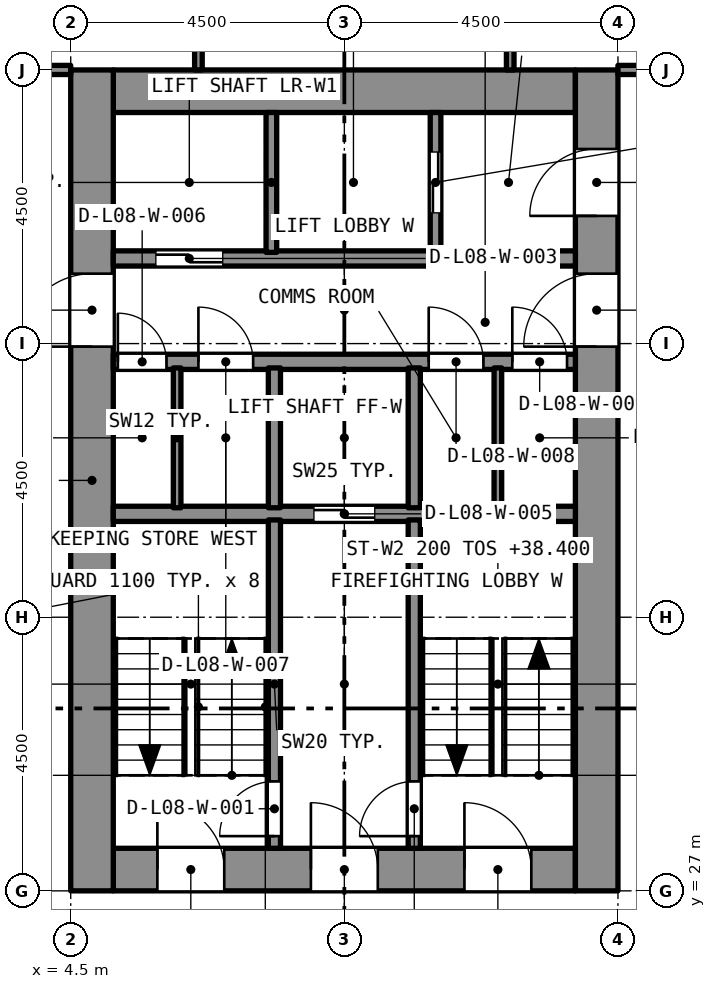
"""IFC4 building model, lengths in metres.
Left out: names, types, materials, properties, quantities, classifications, styles, units other than length and angle.
Written with IfcOpenShell. Run it as: python <this file> out.ifc"""

import sys

from ifc_helpers import new_model, si_unit, direction, frame, frame_2d, origin, place, context, subcontext, project, spatial, rectangle, extrude, element, fill, save


model = new_model("IFC4")
c1 = context("Model", 3, precision=1e-05, world=origin(), true_north=direction((0.0, 1.0)))
c2 = subcontext(c1, "Body", "Model", "MODEL_VIEW")
j1 = project(units=[si_unit("LENGTHUNIT", "METRE"), si_unit("PLANEANGLEUNIT", "RADIAN")], contexts=[c1])
p1 = place(None, origin())
s1 = spatial("IfcSite", under=j1, at=p1, CompositionType="ELEMENT")
p2 = place(p1, origin())
s2 = spatial("IfcBuilding", under=s1, at=p2, CompositionType="ELEMENT")
p3 = place(p2, frame((0.0, 0.0, 36.8)))
s3 = spatial("IfcBuildingStorey", under=s2, at=p3, CompositionType="ELEMENT", Elevation=36.8)
p4 = place(p3, frame((5.2, 27.35, 0.0), z_axis=(0.0, 0.0, 1.0), x_axis=(1.0, 0.0, 0.0)))
e1 = element("IfcWall", 1, at=p4, inside=s3, PredefinedType="SOLIDWALL", context=c2, shape_type="SweptSolid", body=[
    extrude(rectangle(XDim=7.6, YDim=0.7, at=frame_2d((3.8, 0.0))), origin(), (0.0, 0.0, 1.0), 3.2),
])
p5 = place(p4, frame((0.725, 0.0, 0.0)))
e2 = element("IfcOpeningElement", 2, at=p5, cuts=e1, PredefinedType="OPENING", context=c2, shape_type="SweptSolid", body=[
    extrude(rectangle(XDim=1.1, YDim=2.1, at=frame_2d((0.55, 1.05))), frame((0.0, 0.36, 0.0), z_axis=(0.0, -1.0, 0.0), x_axis=(1.0, 0.0, 0.0)), (0.0, 0.0, 1.0), 0.72),
])
p6 = place(p4, frame((3.25, 0.0, 0.0)))
e3 = element("IfcOpeningElement", 3, at=p6, cuts=e1, PredefinedType="OPENING", context=c2, shape_type="SweptSolid", body=[
    extrude(rectangle(XDim=1.1, YDim=2.1, at=frame_2d((0.55, 1.05))), frame((0.0, 0.36, 0.0), z_axis=(0.0, -1.0, 0.0), x_axis=(1.0, 0.0, 0.0)), (0.0, 0.0, 1.0), 0.72),
])
p7 = place(p4, frame((5.775, 0.0, 0.0)))
e4 = element("IfcOpeningElement", 4, at=p7, cuts=e1, PredefinedType="OPENING", context=c2, shape_type="SweptSolid", body=[
    extrude(rectangle(XDim=1.1, YDim=2.1, at=frame_2d((0.55, 1.05))), frame((0.0, 0.36, 0.0), z_axis=(0.0, -1.0, 0.0), x_axis=(1.0, 0.0, 0.0)), (0.0, 0.0, 1.0), 0.72),
])
p8 = place(p3, frame((5.2, 40.15, 0.0), z_axis=(0.0, 0.0, 1.0), x_axis=(1.0, 0.0, 0.0)))
e5 = element("IfcWall", 5, at=p8, inside=s3, PredefinedType="SOLIDWALL", context=c2, shape_type="SweptSolid", body=[
    extrude(rectangle(XDim=7.6, YDim=0.7, at=frame_2d((3.8, 0.0))), origin(), (0.0, 0.0, 1.0), 3.2),
])
p9 = place(p3, frame((4.85, 27.0, 0.0), z_axis=(0.0, 0.0, 1.0), x_axis=(0.0, 1.0, 0.0)))
e6 = element("IfcWall", 6, at=p9, inside=s3, PredefinedType="SOLIDWALL", context=c2, shape_type="SweptSolid", body=[
    extrude(rectangle(XDim=13.5, YDim=0.7, at=frame_2d((6.75, 0.0))), origin(), (0.0, 0.0, 1.0), 3.2),
])
p10 = place(p9, frame((8.95, 0.0, 0.0)))
e7 = element("IfcOpeningElement", 7, at=p10, cuts=e6, PredefinedType="OPENING", context=c2, shape_type="SweptSolid", body=[
    extrude(rectangle(XDim=1.2, YDim=2.1, at=frame_2d((0.6, 1.05))), frame((0.0, 0.36, 0.0), z_axis=(0.0, -1.0, 0.0), x_axis=(1.0, 0.0, 0.0)), (0.0, 0.0, 1.0), 0.72),
])
p11 = place(p3, frame((13.15, 27.0, 0.0), z_axis=(0.0, 0.0, 1.0), x_axis=(0.0, 1.0, 0.0)))
e8 = element("IfcWall", 8, at=p11, inside=s3, PredefinedType="SOLIDWALL", context=c2, shape_type="SweptSolid", body=[
    extrude(rectangle(XDim=13.5, YDim=0.7, at=frame_2d((6.75, 0.0))), origin(), (0.0, 0.0, 1.0), 3.2),
])
p12 = place(p11, frame((11.1, 0.0, 0.0)))
e9 = element("IfcOpeningElement", 9, at=p12, cuts=e8, PredefinedType="OPENING", context=c2, shape_type="SweptSolid", body=[
    extrude(rectangle(XDim=1.1, YDim=2.1, at=frame_2d((0.55, 1.05))), frame((0.0, 0.36, 0.0), z_axis=(0.0, -1.0, 0.0), x_axis=(1.0, 0.0, 0.0)), (0.0, 0.0, 1.0), 0.72),
])
p13 = place(p11, frame((8.95, 0.0, 0.0)))
e10 = element("IfcOpeningElement", 10, at=p13, cuts=e8, PredefinedType="OPENING", context=c2, shape_type="SweptSolid", body=[
    extrude(rectangle(XDim=1.2, YDim=2.1, at=frame_2d((0.6, 1.05))), frame((0.0, 0.36, 0.0), z_axis=(0.0, -1.0, 0.0), x_axis=(1.0, 0.0, 0.0)), (0.0, 0.0, 1.0), 0.72),
])
for number, where, z_axis, x_axis in (
    (11, (6.6, 40.5, 0.0), (0.0, 0.0, 1.0), (0.0, 1.0, 0.0)),
    (12, (11.728, 40.5, 0.0), (0.0, 0.0, 1.0), (0.0, 1.0, 0.0)),
):
    element("IfcWall", number, at=place(p3, frame(where, z_axis=z_axis, x_axis=x_axis)), inside=s3, PredefinedType="PARTITIONING", context=c2, shape_type="SweptSolid", body=[
        extrude(rectangle(XDim=3.157, YDim=0.125, at=frame_2d((1.579, 0.0))), origin(), (0.0, 0.0, 1.0), 2.9),
    ])
p14 = place(p3, frame((0.7, 40.5, 0.0), z_axis=(0.0, 0.0, 1.0), x_axis=(1.0, 0.0, 0.0)))
e13 = element("IfcWall", 13, at=p14, inside=s3, PredefinedType="PARTITIONING", context=c2, shape_type="SweptSolid", body=[
    extrude(rectangle(XDim=3.8, YDim=0.15, at=frame_2d((1.9, 0.0))), origin(), (0.0, 0.0, 1.0), 2.9),
])
p15 = place(p14, frame((1.05, 0.0, 0.0)))
e14 = element("IfcOpeningElement", 14, at=p15, cuts=e13, PredefinedType="OPENING", context=c2, shape_type="SweptSolid", body=[
    extrude(rectangle(XDim=1.0, YDim=2.1, at=frame_2d((0.5, 1.05))), frame((0.0, 0.085, 0.0), z_axis=(0.0, -1.0, 0.0), x_axis=(1.0, 0.0, 0.0)), (0.0, 0.0, 1.0), 0.17),
])
p16 = place(p3, frame((13.5, 40.5, 0.0), z_axis=(0.0, 0.0, 1.0), x_axis=(1.0, 0.0, 0.0)))
e15 = element("IfcWall", 15, at=p16, inside=s3, PredefinedType="PARTITIONING", context=c2, shape_type="SweptSolid", body=[
    extrude(rectangle(XDim=3.8, YDim=0.15, at=frame_2d((1.9, 0.0))), origin(), (0.0, 0.0, 1.0), 2.9),
])
p17 = place(p3, frame((5.2, 33.2, 0.0), z_axis=(0.0, 0.0, 1.0), x_axis=(1.0, 0.0, 0.0)))
e16 = element("IfcWall", 16, at=p17, inside=s3, PredefinedType="SOLIDWALL", context=c2, shape_type="SweptSolid", body=[
    extrude(rectangle(XDim=7.6, YDim=0.25, at=frame_2d((3.8, 0.0))), origin(), (0.0, 0.0, 1.0), 2.9),
])
p18 = place(p17, frame((3.3, 0.0, 0.0)))
e17 = element("IfcOpeningElement", 17, at=p18, cuts=e16, PredefinedType="OPENING", context=c2, shape_type="SweptSolid", body=[
    extrude(rectangle(XDim=1.0, YDim=2.1, at=frame_2d((0.5, 1.05))), frame((0.0, 0.135, 0.0), z_axis=(0.0, -1.0, 0.0), x_axis=(1.0, 0.0, 0.0)), (0.0, 0.0, 1.0), 0.27),
])
p19 = place(p3, frame((5.2, 35.7, 0.0), z_axis=(0.0, 0.0, 1.0), x_axis=(1.0, 0.0, 0.0)))
e18 = element("IfcWall", 18, at=p19, inside=s3, PredefinedType="SOLIDWALL", context=c2, shape_type="SweptSolid", body=[
    extrude(rectangle(XDim=7.6, YDim=0.25, at=frame_2d((3.8, 0.0))), origin(), (0.0, 0.0, 1.0), 2.9),
])
p20 = place(p19, frame((0.075, 0.0, 0.0)))
e19 = element("IfcOpeningElement", 19, at=p20, cuts=e18, PredefinedType="OPENING", context=c2, shape_type="SweptSolid", body=[
    extrude(rectangle(XDim=0.8, YDim=2.1, at=frame_2d((0.4, 1.05))), frame((0.0, 0.135, 0.0), z_axis=(0.0, -1.0, 0.0), x_axis=(1.0, 0.0, 0.0)), (0.0, 0.0, 1.0), 0.27),
])
p21 = place(p19, frame((1.4, 0.0, 0.0)))
e20 = element("IfcOpeningElement", 20, at=p21, cuts=e18, PredefinedType="OPENING", context=c2, shape_type="SweptSolid", body=[
    extrude(rectangle(XDim=0.9, YDim=2.1, at=frame_2d((0.45, 1.05))), frame((0.0, 0.135, 0.0), z_axis=(0.0, -1.0, 0.0), x_axis=(1.0, 0.0, 0.0)), (0.0, 0.0, 1.0), 0.27),
])
p22 = place(p19, frame((5.188, 0.0, 0.0)))
e21 = element("IfcOpeningElement", 21, at=p22, cuts=e18, PredefinedType="OPENING", context=c2, shape_type="SweptSolid", body=[
    extrude(rectangle(XDim=0.9, YDim=2.1, at=frame_2d((0.45, 1.05))), frame((0.0, 0.135, 0.0), z_axis=(0.0, -1.0, 0.0), x_axis=(1.0, 0.0, 0.0)), (0.0, 0.0, 1.0), 0.27),
])
p23 = place(p19, frame((6.562, 0.0, 0.0)))
e22 = element("IfcOpeningElement", 22, at=p23, cuts=e18, PredefinedType="OPENING", context=c2, shape_type="SweptSolid", body=[
    extrude(rectangle(XDim=0.9, YDim=2.1, at=frame_2d((0.45, 1.05))), frame((0.0, 0.135, 0.0), z_axis=(0.0, -1.0, 0.0), x_axis=(1.0, 0.0, 0.0)), (0.0, 0.0, 1.0), 0.27),
])
p24 = place(p3, frame((5.2, 37.4, 0.0), z_axis=(0.0, 0.0, 1.0), x_axis=(1.0, 0.0, 0.0)))
e23 = element("IfcWall", 23, at=p24, inside=s3, PredefinedType="SOLIDWALL", context=c2, shape_type="SweptSolid", body=[
    extrude(rectangle(XDim=7.6, YDim=0.25, at=frame_2d((3.8, 0.0))), origin(), (0.0, 0.0, 1.0), 2.9),
])
p25 = place(p24, frame((0.7, 0.0, 0.0)))
e24 = element("IfcOpeningElement", 24, at=p25, cuts=e23, PredefinedType="OPENING", context=c2, shape_type="SweptSolid", body=[
    extrude(rectangle(XDim=1.1, YDim=2.4, at=frame_2d((0.55, 1.2))), frame((0.0, 0.135, 0.0), z_axis=(0.0, -1.0, 0.0), x_axis=(1.0, 0.0, 0.0)), (0.0, 0.0, 1.0), 0.27),
])
p26 = place(p3, frame((7.85, 27.7, 0.0), z_axis=(0.0, 0.0, 1.0), x_axis=(0.0, 1.0, 0.0)))
e25 = element("IfcWall", 25, at=p26, inside=s3, PredefinedType="SOLIDWALL", context=c2, shape_type="SweptSolid", body=[
    extrude(rectangle(XDim=5.4, YDim=0.2, at=frame_2d((2.7, 0.0))), origin(), (0.0, 0.0, 1.0), 2.9),
])
p27 = place(p26, frame((0.2, 0.0, 0.0)))
e26 = element("IfcOpeningElement", 26, at=p27, cuts=e25, PredefinedType="OPENING", context=c2, shape_type="SweptSolid", body=[
    extrude(rectangle(XDim=0.9, YDim=2.1, at=frame_2d((0.45, 1.05))), frame((0.0, 0.11, 0.0), z_axis=(0.0, -1.0, 0.0), x_axis=(1.0, 0.0, 0.0)), (0.0, 0.0, 1.0), 0.22),
])
p28 = place(p3, frame((10.15, 27.7, 0.0), z_axis=(0.0, 0.0, 1.0), x_axis=(0.0, 1.0, 0.0)))
e27 = element("IfcWall", 27, at=p28, inside=s3, PredefinedType="SOLIDWALL", context=c2, shape_type="SweptSolid", body=[
    extrude(rectangle(XDim=5.4, YDim=0.2, at=frame_2d((2.7, 0.0))), origin(), (0.0, 0.0, 1.0), 2.9),
])
p29 = place(p28, frame((0.2, 0.0, 0.0)))
e28 = element("IfcOpeningElement", 28, at=p29, cuts=e27, PredefinedType="OPENING", context=c2, shape_type="SweptSolid", body=[
    extrude(rectangle(XDim=0.9, YDim=2.1, at=frame_2d((0.45, 1.05))), frame((0.0, 0.11, 0.0), z_axis=(0.0, -1.0, 0.0), x_axis=(1.0, 0.0, 0.0)), (0.0, 0.0, 1.0), 0.22),
])
for number, where, z_axis, x_axis in (
    (29, (7.85, 33.3, 0.0), (0.0, 0.0, 1.0), (0.0, 1.0, 0.0)),
    (30, (10.15, 33.3, 0.0), (0.0, 0.0, 1.0), (0.0, 1.0, 0.0)),
):
    element("IfcWall", number, at=place(p3, frame(where, z_axis=z_axis, x_axis=x_axis)), inside=s3, PredefinedType="SOLIDWALL", context=c2, shape_type="SweptSolid", body=[
        extrude(rectangle(XDim=2.3, YDim=0.2, at=frame_2d((1.15, 0.0))), origin(), (0.0, 0.0, 1.0), 2.9),
    ])
p30 = place(p3, frame((7.8, 37.5, 0.0), z_axis=(0.0, 0.0, 1.0), x_axis=(0.0, 1.0, 0.0)))
e31 = element("IfcWall", 31, at=p30, inside=s3, PredefinedType="SOLIDWALL", context=c2, shape_type="SweptSolid", body=[
    extrude(rectangle(XDim=2.3, YDim=0.175, at=frame_2d((1.15, 0.0))), origin(), (0.0, 0.0, 1.0), 2.9),
])
p31 = place(p3, frame((10.5, 37.5, 0.0), z_axis=(0.0, 0.0, 1.0), x_axis=(0.0, 1.0, 0.0)))
e32 = element("IfcWall", 32, at=p31, inside=s3, PredefinedType="SOLIDWALL", context=c2, shape_type="SweptSolid", body=[
    extrude(rectangle(XDim=2.3, YDim=0.175, at=frame_2d((1.15, 0.0))), origin(), (0.0, 0.0, 1.0), 2.9),
])
p32 = place(p31, frame((0.65, 0.0, 0.0)))
e33 = element("IfcOpeningElement", 33, at=p32, cuts=e32, PredefinedType="OPENING", context=c2, shape_type="SweptSolid", body=[
    extrude(rectangle(XDim=1.0, YDim=2.1, at=frame_2d((0.5, 1.05))), frame((0.0, 0.097, 0.0), z_axis=(0.0, -1.0, 0.0), x_axis=(1.0, 0.0, 0.0)), (0.0, 0.0, 1.0), 0.195),
])
for number, where, z_axis, x_axis in (
    (34, (6.25, 33.3, 0.0), (0.0, 0.0, 1.0), (0.0, 1.0, 0.0)),
    (35, (11.525, 33.3, 0.0), (0.0, 0.0, 1.0), (0.0, 1.0, 0.0)),
):
    element("IfcWall", number, at=place(p3, frame(where, z_axis=z_axis, x_axis=x_axis)), inside=s3, PredefinedType="PARTITIONING", context=c2, shape_type="SweptSolid", body=[
        extrude(rectangle(XDim=2.3, YDim=0.125, at=frame_2d((1.15, 0.0))), origin(), (0.0, 0.0, 1.0), 2.9),
    ])
p33 = place(p27, origin())
e36 = element("IfcDoor", 36, at=p33, inside=s3, OperationType="SINGLE_SWING_LEFT", PredefinedType="DOOR", context=c2, shape_type="SweptSolid", body=[
    extrude(rectangle(XDim=0.9, YDim=2.1, at=frame_2d((0.45, 1.05))), frame((0.0, 0.025, 0.0), z_axis=(0.0, -1.0, 0.0), x_axis=(1.0, 0.0, 0.0)), (0.0, 0.0, 1.0), 0.05),
])
fill(e26, e36)
p34 = place(p29, origin())
e37 = element("IfcDoor", 37, at=p34, inside=s3, OperationType="SINGLE_SWING_LEFT", PredefinedType="DOOR", context=c2, shape_type="SweptSolid", body=[
    extrude(rectangle(XDim=0.9, YDim=2.1, at=frame_2d((0.45, 1.05))), frame((0.0, 0.025, 0.0), z_axis=(0.0, -1.0, 0.0), x_axis=(1.0, 0.0, 0.0)), (0.0, 0.0, 1.0), 0.05),
])
fill(e28, e37)
p35 = place(p25, origin())
e38 = element("IfcDoor", 38, at=p35, inside=s3, OperationType="SLIDING_TO_LEFT", PredefinedType="DOOR", context=c2, shape_type="SweptSolid", body=[
    extrude(rectangle(XDim=1.1, YDim=2.4, at=frame_2d((0.55, 1.2))), frame((0.0, 0.025, 0.0), z_axis=(0.0, -1.0, 0.0), x_axis=(1.0, 0.0, 0.0)), (0.0, 0.0, 1.0), 0.05),
])
fill(e24, e38)
p36 = place(p32, origin())
e39 = element("IfcDoor", 39, at=p36, inside=s3, OperationType="SLIDING_TO_LEFT", PredefinedType="DOOR", context=c2, shape_type="SweptSolid", body=[
    extrude(rectangle(XDim=1.0, YDim=2.1, at=frame_2d((0.5, 1.05))), frame((0.0, 0.025, 0.0), z_axis=(0.0, -1.0, 0.0), x_axis=(1.0, 0.0, 0.0)), (0.0, 0.0, 1.0), 0.05),
])
fill(e33, e39)
p37 = place(p18, origin())
e40 = element("IfcDoor", 40, at=p37, inside=s3, OperationType="SLIDING_TO_LEFT", PredefinedType="DOOR", context=c2, shape_type="SweptSolid", body=[
    extrude(rectangle(XDim=1.0, YDim=2.1, at=frame_2d((0.5, 1.05))), frame((0.0, 0.025, 0.0), z_axis=(0.0, -1.0, 0.0), x_axis=(1.0, 0.0, 0.0)), (0.0, 0.0, 1.0), 0.05),
])
fill(e17, e40)
p38 = place(p20, origin())
e41 = element("IfcDoor", 41, at=p38, inside=s3, OperationType="SINGLE_SWING_LEFT", PredefinedType="DOOR", context=c2, shape_type="SweptSolid", body=[
    extrude(rectangle(XDim=0.8, YDim=2.1, at=frame_2d((0.4, 1.05))), frame((0.0, 0.025, 0.0), z_axis=(0.0, -1.0, 0.0), x_axis=(1.0, 0.0, 0.0)), (0.0, 0.0, 1.0), 0.05),
])
fill(e19, e41)
p39 = place(p21, origin())
e42 = element("IfcDoor", 42, at=p39, inside=s3, OperationType="SINGLE_SWING_LEFT", PredefinedType="DOOR", context=c2, shape_type="SweptSolid", body=[
    extrude(rectangle(XDim=0.9, YDim=2.1, at=frame_2d((0.45, 1.05))), frame((0.0, 0.025, 0.0), z_axis=(0.0, -1.0, 0.0), x_axis=(1.0, 0.0, 0.0)), (0.0, 0.0, 1.0), 0.05),
])
fill(e20, e42)
p40 = place(p22, origin())
e43 = element("IfcDoor", 43, at=p40, inside=s3, OperationType="SINGLE_SWING_LEFT", PredefinedType="DOOR", context=c2, shape_type="SweptSolid", body=[
    extrude(rectangle(XDim=0.9, YDim=2.1, at=frame_2d((0.45, 1.05))), frame((0.0, 0.025, 0.0), z_axis=(0.0, -1.0, 0.0), x_axis=(1.0, 0.0, 0.0)), (0.0, 0.0, 1.0), 0.05),
])
fill(e21, e43)
p41 = place(p23, origin())
e44 = element("IfcDoor", 44, at=p41, inside=s3, OperationType="SINGLE_SWING_LEFT", PredefinedType="DOOR", context=c2, shape_type="SweptSolid", body=[
    extrude(rectangle(XDim=0.9, YDim=2.1, at=frame_2d((0.45, 1.05))), frame((0.0, 0.025, 0.0), z_axis=(0.0, -1.0, 0.0), x_axis=(1.0, 0.0, 0.0)), (0.0, 0.0, 1.0), 0.05),
])
fill(e22, e44)
p42 = place(p5, origin())
e45 = element("IfcDoor", 45, at=p42, inside=s3, OperationType="SINGLE_SWING_LEFT", PredefinedType="DOOR", context=c2, shape_type="SweptSolid", body=[
    extrude(rectangle(XDim=1.1, YDim=2.1, at=frame_2d((0.55, 1.05))), frame((0.0, 0.025, 0.0), z_axis=(0.0, -1.0, 0.0), x_axis=(1.0, 0.0, 0.0)), (0.0, 0.0, 1.0), 0.05),
])
fill(e2, e45)
p43 = place(p6, origin())
e46 = element("IfcDoor", 46, at=p43, inside=s3, OperationType="SINGLE_SWING_LEFT", PredefinedType="DOOR", context=c2, shape_type="SweptSolid", body=[
    extrude(rectangle(XDim=1.1, YDim=2.1, at=frame_2d((0.55, 1.05))), frame((0.0, 0.025, 0.0), z_axis=(0.0, -1.0, 0.0), x_axis=(1.0, 0.0, 0.0)), (0.0, 0.0, 1.0), 0.05),
])
fill(e3, e46)
p44 = place(p7, origin())
e47 = element("IfcDoor", 47, at=p44, inside=s3, OperationType="SINGLE_SWING_LEFT", PredefinedType="DOOR", context=c2, shape_type="SweptSolid", body=[
    extrude(rectangle(XDim=1.1, YDim=2.1, at=frame_2d((0.55, 1.05))), frame((0.0, 0.025, 0.0), z_axis=(0.0, -1.0, 0.0), x_axis=(1.0, 0.0, 0.0)), (0.0, 0.0, 1.0), 0.05),
])
fill(e4, e47)
p45 = place(p12, origin())
e48 = element("IfcDoor", 48, at=p45, inside=s3, OperationType="SINGLE_SWING_LEFT", PredefinedType="DOOR", context=c2, shape_type="SweptSolid", body=[
    extrude(rectangle(XDim=1.1, YDim=2.1, at=frame_2d((0.55, 1.05))), frame((0.0, 0.025, 0.0), z_axis=(0.0, -1.0, 0.0), x_axis=(1.0, 0.0, 0.0)), (0.0, 0.0, 1.0), 0.05),
])
fill(e9, e48)
p46 = place(p10, origin())
e49 = element("IfcDoor", 49, at=p46, inside=s3, OperationType="SINGLE_SWING_LEFT", PredefinedType="DOOR", context=c2, shape_type="SweptSolid", body=[
    extrude(rectangle(XDim=1.2, YDim=2.1, at=frame_2d((0.6, 1.05))), frame((0.0, 0.025, 0.0), z_axis=(0.0, -1.0, 0.0), x_axis=(1.0, 0.0, 0.0)), (0.0, 0.0, 1.0), 0.05),
])
fill(e7, e49)
p47 = place(p13, origin())
e50 = element("IfcDoor", 50, at=p47, inside=s3, OperationType="SINGLE_SWING_LEFT", PredefinedType="DOOR", context=c2, shape_type="SweptSolid", body=[
    extrude(rectangle(XDim=1.2, YDim=2.1, at=frame_2d((0.6, 1.05))), frame((0.0, 0.025, 0.0), z_axis=(0.0, -1.0, 0.0), x_axis=(1.0, 0.0, 0.0)), (0.0, 0.0, 1.0), 0.05),
])
fill(e10, e50)
save(model, sys.argv[1])
